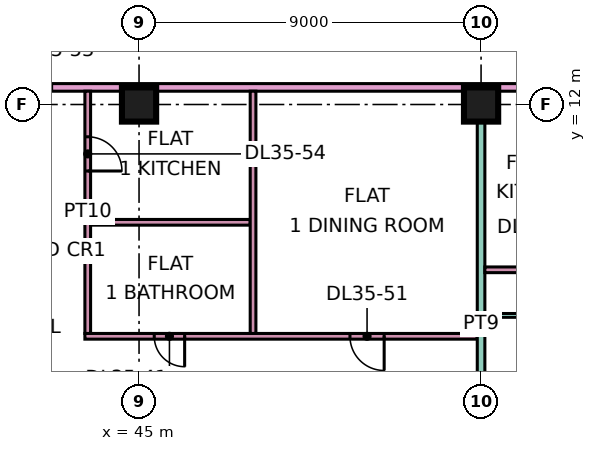
"""IFC4 building model, lengths in metres.
Left out: names, types, materials, properties, quantities, classifications, styles, units other than length and angle.
Written with IfcOpenShell. Run it as: python <this file> out.ifc"""

import sys

from ifc_helpers import new_model, si_unit, direction, frame, frame_2d, origin, origin_2d, place, context, subcontext, project, spatial, rectangle, extrude, element, fill, save


model = new_model("IFC4")
c1 = context("Model", 3, precision=1e-05, world=origin(), true_north=direction((0.0, 1.0)))
c2 = subcontext(c1, "Body", "Model", "MODEL_VIEW")
j1 = project(units=[si_unit("LENGTHUNIT", "METRE"), si_unit("PLANEANGLEUNIT", "RADIAN")], contexts=[c1])
p1 = place(None, origin())
s1 = spatial("IfcSite", under=j1, at=p1, CompositionType="ELEMENT")
p2 = place(p1, origin())
s2 = spatial("IfcBuilding", under=s1, at=p2, CompositionType="ELEMENT")
p3 = place(p2, frame((0.0, 0.0, 157.4)))
s3 = spatial("IfcBuildingStorey", under=s2, at=p3, CompositionType="ELEMENT", Elevation=157.4)
for number, where, z_axis, x_axis in (
    (1, (45.0, 12.0, 0.0), (0.0, 0.0, 1.0), (1.0, 0.0, 0.0)),
    (2, (54.0, 12.0, 0.0), (0.0, 0.0, 1.0), (1.0, 0.0, 0.0)),
):
    element("IfcColumn", number, at=place(p3, frame(where, z_axis=z_axis, x_axis=x_axis)), inside=s3, PredefinedType="COLUMN", context=c2, shape_type="SweptSolid", body=[
        extrude(rectangle(XDim=0.9, YDim=0.9, at=origin_2d()), origin(), (0.0, 0.0, 1.0), 3.75),
    ])
p4 = place(p3, frame((40.65, 12.45, 0.0), z_axis=(0.0, 0.0, 1.0), x_axis=(1.0, 0.0, 0.0)))
e3 = element("IfcWall", 3, at=p4, inside=s3, PredefinedType="PARTITIONING", context=c2, shape_type="SweptSolid", body=[
    extrude(rectangle(XDim=22.35, YDim=0.2, at=frame_2d((11.175, 0.0))), origin(), (0.0, 0.0, 1.0), 3.35),
])
p5 = place(p4, frame((20.1, 0.0, 0.0)))
e4 = element("IfcOpeningElement", 4, at=p5, cuts=e3, PredefinedType="OPENING", context=c2, shape_type="SweptSolid", body=[
    extrude(rectangle(XDim=1.0, YDim=2.1, at=frame_2d((0.5, 1.05))), frame((0.0, 0.11, 0.0), z_axis=(0.0, -1.0, 0.0), x_axis=(1.0, 0.0, 0.0)), (0.0, 0.0, 1.0), 0.22),
])
p6 = place(p4, frame((1.05, 0.0, 0.0)))
e5 = element("IfcOpeningElement", 5, at=p6, cuts=e3, PredefinedType="OPENING", context=c2, shape_type="SweptSolid", body=[
    extrude(rectangle(XDim=1.0, YDim=2.1, at=frame_2d((0.5, 1.05))), frame((0.0, 0.11, 0.0), z_axis=(0.0, -1.0, 0.0), x_axis=(1.0, 0.0, 0.0)), (0.0, 0.0, 1.0), 0.22),
])
p7 = place(p3, frame((43.575, 5.9, 0.0), z_axis=(0.0, 0.0, 1.0), x_axis=(1.0, 0.0, 0.0)))
e6 = element("IfcWall", 6, at=p7, inside=s3, PredefinedType="PARTITIONING", context=c2, shape_type="SweptSolid", body=[
    extrude(rectangle(XDim=10.325, YDim=0.15, at=frame_2d((5.163, 0.0))), origin(), (0.0, 0.0, 1.0), 3.35),
])
p8 = place(p7, frame((1.825, 0.0, 0.0)))
e7 = element("IfcOpeningElement", 7, at=p8, cuts=e6, PredefinedType="OPENING", context=c2, shape_type="SweptSolid", body=[
    extrude(rectangle(XDim=0.8, YDim=2.1, at=frame_2d((0.4, 1.05))), frame((0.0, 0.085, 0.0), z_axis=(0.0, -1.0, 0.0), x_axis=(1.0, 0.0, 0.0)), (0.0, 0.0, 1.0), 0.17),
])
p9 = place(p7, frame((6.975, 0.0, 0.0)))
e8 = element("IfcOpeningElement", 8, at=p9, cuts=e6, PredefinedType="OPENING", context=c2, shape_type="SweptSolid", body=[
    extrude(rectangle(XDim=0.9, YDim=2.1, at=frame_2d((0.45, 1.05))), frame((0.0, 0.085, 0.0), z_axis=(0.0, -1.0, 0.0), x_axis=(1.0, 0.0, 0.0)), (0.0, 0.0, 1.0), 0.17),
])
p10 = place(p3, frame((43.65, 5.975, 0.0), z_axis=(0.0, 0.0, 1.0), x_axis=(0.0, 1.0, 0.0)))
e9 = element("IfcWall", 9, at=p10, inside=s3, PredefinedType="PARTITIONING", context=c2, shape_type="SweptSolid", body=[
    extrude(rectangle(XDim=6.375, YDim=0.15, at=frame_2d((3.188, 0.0))), origin(), (0.0, 0.0, 1.0), 3.35),
])
p11 = place(p10, frame((4.275, 0.0, 0.0)))
e10 = element("IfcOpeningElement", 10, at=p11, cuts=e9, PredefinedType="OPENING", context=c2, shape_type="SweptSolid", body=[
    extrude(rectangle(XDim=0.9, YDim=2.1, at=frame_2d((0.45, 1.05))), frame((0.0, 0.085, 0.0), z_axis=(0.0, -1.0, 0.0), x_axis=(1.0, 0.0, 0.0)), (0.0, 0.0, 1.0), 0.17),
])
p12 = place(p3, frame((43.725, 8.9, 0.0), z_axis=(0.0, 0.0, 1.0), x_axis=(1.0, 0.0, 0.0)))
e11 = element("IfcWall", 11, at=p12, inside=s3, PredefinedType="PARTITIONING", context=c2, shape_type="SweptSolid", body=[
    extrude(rectangle(XDim=4.2, YDim=0.15, at=frame_2d((2.1, 0.0))), origin(), (0.0, 0.0, 1.0), 3.35),
])
p13 = place(p3, frame((48.0, 5.975, 0.0), z_axis=(0.0, 0.0, 1.0), x_axis=(0.0, 1.0, 0.0)))
e12 = element("IfcWall", 12, at=p13, inside=s3, PredefinedType="PARTITIONING", context=c2, shape_type="SweptSolid", body=[
    extrude(rectangle(XDim=6.375, YDim=0.15, at=frame_2d((3.188, 0.0))), origin(), (0.0, 0.0, 1.0), 3.35),
])
p14 = place(p3, frame((54.0, 0.074, 0.0), z_axis=(0.0, 0.0, 1.0), x_axis=(0.0, 1.0, 0.0)))
e13 = element("IfcWall", 13, at=p14, inside=s3, PredefinedType="PARTITIONING", context=c2, shape_type="SweptSolid", body=[
    extrude(rectangle(XDim=12.276, YDim=0.2, at=frame_2d((6.138, 0.0))), origin(), (0.0, 0.0, 1.0), 3.35),
])
p15 = place(p3, frame((54.1, 6.45, 0.0), z_axis=(0.0, 0.0, 1.0), x_axis=(1.0, 0.0, 0.0)))
e14 = element("IfcWall", 14, at=p15, inside=s3, PredefinedType="PARTITIONING", context=c2, shape_type="SweptSolid", body=[
    extrude(rectangle(XDim=2.85, YDim=0.1, at=frame_2d((1.425, 0.0))), origin(), (0.0, 0.0, 1.0), 3.35),
])
p16 = place(p15, frame((0.95, 0.0, 0.0)))
e15 = element("IfcOpeningElement", 15, at=p16, cuts=e14, PredefinedType="OPENING", context=c2, shape_type="SweptSolid", body=[
    extrude(rectangle(XDim=0.9, YDim=2.1, at=frame_2d((0.45, 1.05))), frame((0.0, 0.06, 0.0), z_axis=(0.0, -1.0, 0.0), x_axis=(1.0, 0.0, 0.0)), (0.0, 0.0, 1.0), 0.12),
])
p17 = place(p3, frame((54.1, 7.65, 0.0), z_axis=(0.0, 0.0, 1.0), x_axis=(1.0, 0.0, 0.0)))
e16 = element("IfcWall", 16, at=p17, inside=s3, PredefinedType="PARTITIONING", context=c2, shape_type="SweptSolid", body=[
    extrude(rectangle(XDim=5.375, YDim=0.15, at=frame_2d((2.688, 0.0))), origin(), (0.0, 0.0, 1.0), 3.35),
])
p18 = place(p17, frame((3.75, 0.0, 0.0)))
e17 = element("IfcOpeningElement", 17, at=p18, cuts=e16, PredefinedType="OPENING", context=c2, shape_type="SweptSolid", body=[
    extrude(rectangle(XDim=0.8, YDim=2.1, at=frame_2d((0.4, 1.05))), frame((0.0, 0.085, 0.0), z_axis=(0.0, -1.0, 0.0), x_axis=(1.0, 0.0, 0.0)), (0.0, 0.0, 1.0), 0.17),
])
p19 = place(p17, frame((0.95, 0.0, 0.0)))
e18 = element("IfcOpeningElement", 18, at=p19, cuts=e16, PredefinedType="OPENING", context=c2, shape_type="SweptSolid", body=[
    extrude(rectangle(XDim=0.9, YDim=2.1, at=frame_2d((0.45, 1.05))), frame((0.0, 0.085, 0.0), z_axis=(0.0, -1.0, 0.0), x_axis=(1.0, 0.0, 0.0)), (0.0, 0.0, 1.0), 0.17),
])
p20 = place(p8, origin())
e19 = element("IfcDoor", 19, at=p20, inside=s3, OperationType="SINGLE_SWING_RIGHT", PredefinedType="DOOR", context=c2, shape_type="SweptSolid", body=[
    extrude(rectangle(XDim=0.8, YDim=2.1, at=frame_2d((0.4, 1.05))), frame((0.0, 0.025, 0.0), z_axis=(0.0, -1.0, 0.0), x_axis=(1.0, 0.0, 0.0)), (0.0, 0.0, 1.0), 0.05),
])
fill(e7, e19)
p21 = place(p9, origin())
e20 = element("IfcDoor", 20, at=p21, inside=s3, OperationType="SINGLE_SWING_RIGHT", PredefinedType="DOOR", context=c2, shape_type="SweptSolid", body=[
    extrude(rectangle(XDim=0.9, YDim=2.1, at=frame_2d((0.45, 1.05))), frame((0.0, 0.025, 0.0), z_axis=(0.0, -1.0, 0.0), x_axis=(1.0, 0.0, 0.0)), (0.0, 0.0, 1.0), 0.05),
])
fill(e8, e20)
p22 = place(p11, frame((0.9, 0.0, 0.0), z_axis=(0.0, 0.0, 1.0), x_axis=(-1.0, 0.0, 0.0)))
e21 = element("IfcDoor", 21, at=p22, inside=s3, OperationType="SINGLE_SWING_LEFT", PredefinedType="DOOR", context=c2, shape_type="SweptSolid", body=[
    extrude(rectangle(XDim=0.9, YDim=2.1, at=frame_2d((0.45, 1.05))), frame((0.0, 0.025, 0.0), z_axis=(0.0, -1.0, 0.0), x_axis=(1.0, 0.0, 0.0)), (0.0, 0.0, 1.0), 0.05),
])
fill(e10, e21)
save(model, sys.argv[1])
